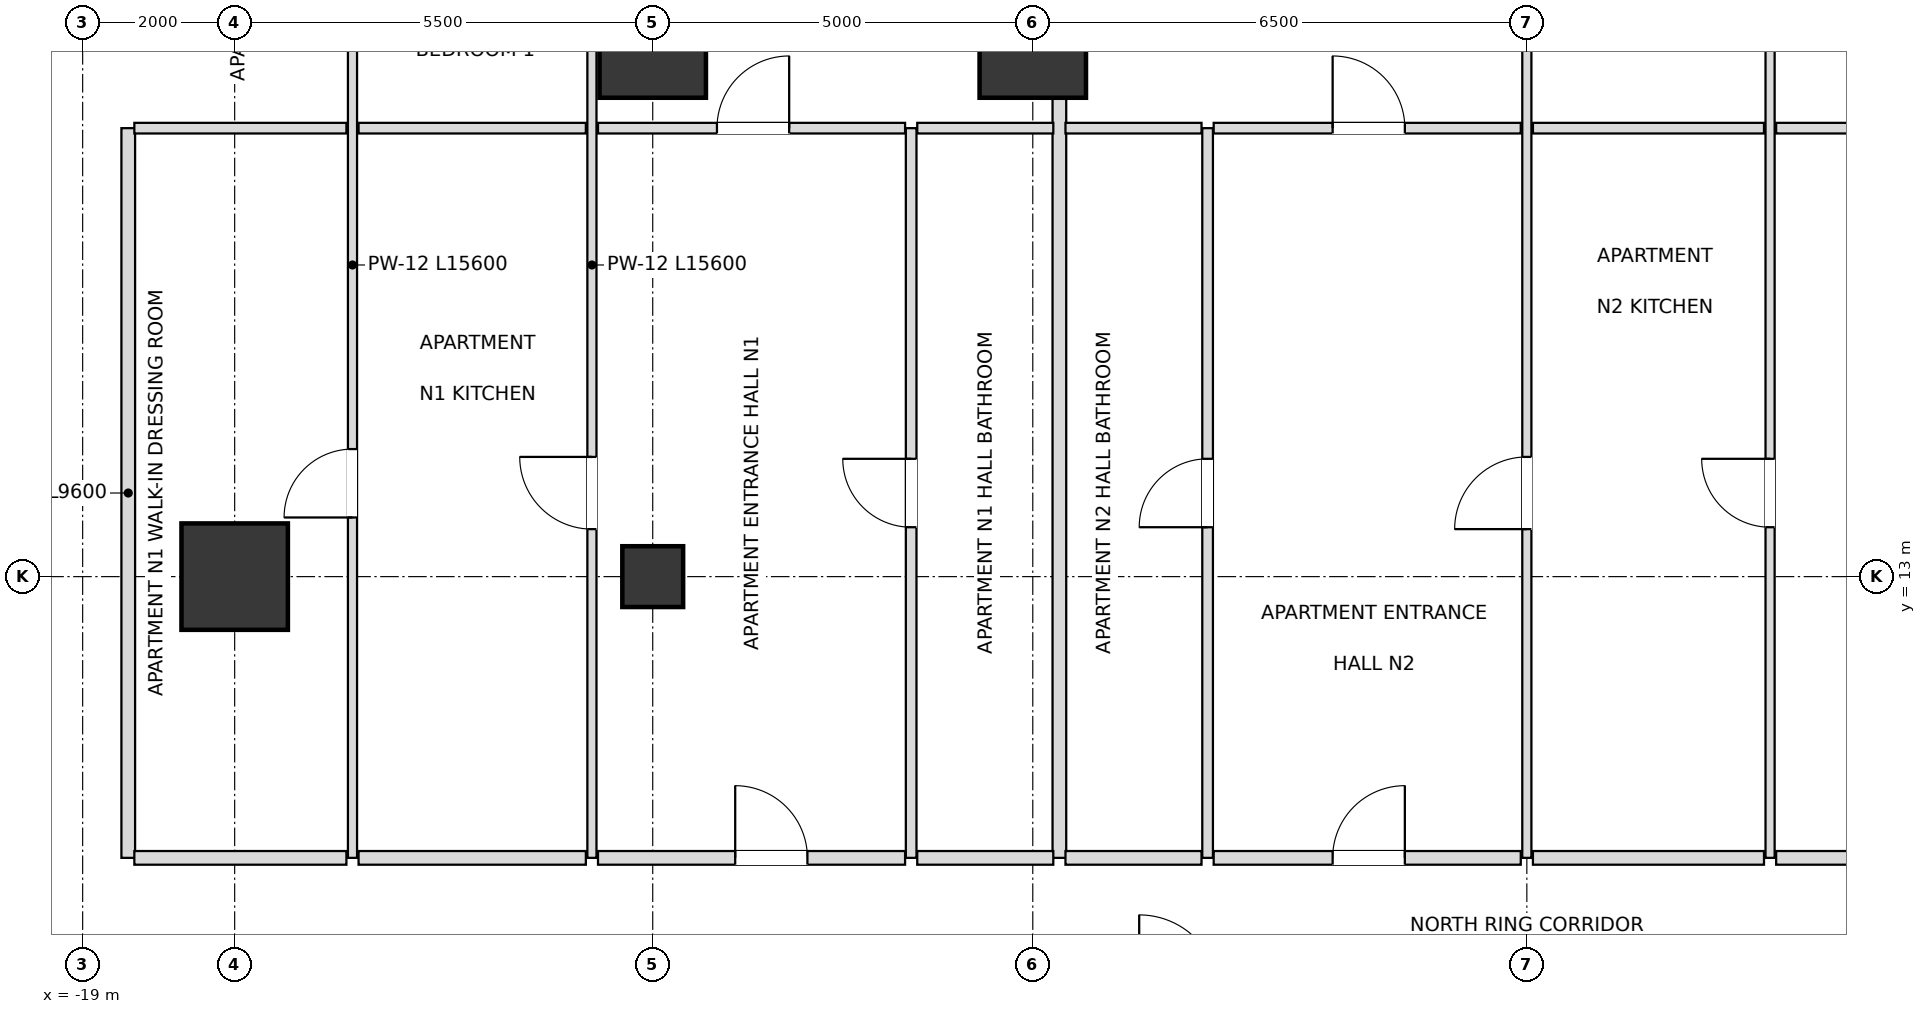
"""IFC4 building model, lengths in metres.
Left out: names, types, materials, properties, quantities, classifications, styles, units other than length and angle.
Written with IfcOpenShell. Run it as: python <this file> out.ifc"""

import sys

from ifc_helpers import new_model, si_unit, direction, frame, frame_2d, origin, origin_2d, place, context, subcontext, project, spatial, rectangle, extrude, element, fill, save


model = new_model("IFC4")
c1 = context("Model", 3, precision=1e-05, world=origin(), true_north=direction((0.0, 1.0)))
c2 = subcontext(c1, "Body", "Model", "MODEL_VIEW")
j1 = project(units=[si_unit("LENGTHUNIT", "METRE"), si_unit("PLANEANGLEUNIT", "RADIAN")], contexts=[c1])
p1 = place(None, origin())
s1 = spatial("IfcSite", under=j1, at=p1, CompositionType="ELEMENT")
p2 = place(p1, origin())
s2 = spatial("IfcBuilding", under=s1, at=p2, CompositionType="ELEMENT")
p3 = place(p2, frame((0.0, 0.0, 46.8)))
s3 = spatial("IfcBuildingStorey", under=s2, at=p3, CompositionType="ELEMENT", Elevation=46.8)
for number, where, z_axis, x_axis in (
    (1, (-6.5, 20.0, 0.0), (0.0, 0.0, 1.0), (1.0, 0.0, 0.0)),
    (2, (-11.5, 20.0, 0.0), (0.0, 0.0, 1.0), (1.0, 0.0, 0.0)),
    (3, (-17.0, 13.0, 0.0), (0.0, 0.0, 1.0), (1.0, 0.0, 0.0)),
):
    element("IfcColumn", number, at=place(p3, frame(where, z_axis=z_axis, x_axis=x_axis)), inside=s3, PredefinedType="USERDEFINED", context=c2, shape_type="SweptSolid", body=[
        extrude(rectangle(XDim=1.4, YDim=1.4, at=origin_2d()), origin(), (0.0, 0.0, 1.0), 3.6),
    ])
p4 = place(p3, frame((-11.5, 13.0, 0.0), z_axis=(0.0, 0.0, 1.0), x_axis=(1.0, 0.0, 0.0)))
e4 = element("IfcColumn", 4, at=p4, inside=s3, PredefinedType="COLUMN", context=c2, shape_type="SweptSolid", body=[
    extrude(rectangle(XDim=0.8, YDim=0.8, at=origin_2d()), origin(), (0.0, 0.0, 1.0), 3.6),
])
p5 = place(p3, frame((-18.4, 9.3, 0.0), z_axis=(0.0, 0.0, 1.0), x_axis=(0.0, 1.0, 0.0)))
e5 = element("IfcWall", 5, at=p5, inside=s3, PredefinedType="PARTITIONING", context=c2, shape_type="SweptSolid", body=[
    extrude(rectangle(XDim=9.6, YDim=0.18, at=frame_2d((4.8, 0.0))), origin(), (0.0, 0.0, 1.0), 2.736),
])
p6 = place(p3, frame((-15.45, 9.3, 0.0), z_axis=(0.0, 0.0, 1.0), x_axis=(0.0, 1.0, 0.0)))
e6 = element("IfcWall", 6, at=p6, inside=s3, PredefinedType="PARTITIONING", context=c2, shape_type="SweptSolid", body=[
    extrude(rectangle(XDim=15.6, YDim=0.12, at=frame_2d((7.8, 0.0))), origin(), (0.0, 0.0, 1.0), 2.736),
])
p7 = place(p6, frame((4.478, 0.0, 0.0)))
e7 = element("IfcOpeningElement", 7, at=p7, cuts=e6, PredefinedType="OPENING", context=c2, shape_type="SweptSolid", body=[
    extrude(rectangle(XDim=0.9, YDim=2.1, at=frame_2d((0.45, 1.05))), frame((0.0, 0.07, 0.0), z_axis=(0.0, -1.0, 0.0), x_axis=(1.0, 0.0, 0.0)), (0.0, 0.0, 1.0), 0.14),
])
p8 = place(p6, frame((12.15, 0.0, 0.0)))
e8 = element("IfcOpeningElement", 8, at=p8, cuts=e6, PredefinedType="OPENING", context=c2, shape_type="SweptSolid", body=[
    extrude(rectangle(XDim=0.9, YDim=2.1, at=frame_2d((0.45, 1.05))), frame((0.0, 0.07, 0.0), z_axis=(0.0, -1.0, 0.0), x_axis=(1.0, 0.0, 0.0)), (0.0, 0.0, 1.0), 0.14),
])
p9 = place(p3, frame((-12.3, 9.3, 0.0), z_axis=(0.0, 0.0, 1.0), x_axis=(0.0, 1.0, 0.0)))
e9 = element("IfcWall", 9, at=p9, inside=s3, PredefinedType="PARTITIONING", context=c2, shape_type="SweptSolid", body=[
    extrude(rectangle(XDim=15.6, YDim=0.12, at=frame_2d((7.8, 0.0))), origin(), (0.0, 0.0, 1.0), 2.736),
])
p10 = place(p9, frame((4.325, 0.0, 0.0)))
e10 = element("IfcOpeningElement", 10, at=p10, cuts=e9, PredefinedType="OPENING", context=c2, shape_type="SweptSolid", body=[
    extrude(rectangle(XDim=0.95, YDim=2.1, at=frame_2d((0.475, 1.05))), frame((0.0, 0.07, 0.0), z_axis=(0.0, -1.0, 0.0), x_axis=(1.0, 0.0, 0.0)), (0.0, 0.0, 1.0), 0.14),
])
p11 = place(p9, frame((12.15, 0.0, 0.0)))
e11 = element("IfcOpeningElement", 11, at=p11, cuts=e9, PredefinedType="OPENING", context=c2, shape_type="SweptSolid", body=[
    extrude(rectangle(XDim=0.9, YDim=2.1, at=frame_2d((0.45, 1.05))), frame((0.0, 0.07, 0.0), z_axis=(0.0, -1.0, 0.0), x_axis=(1.0, 0.0, 0.0)), (0.0, 0.0, 1.0), 0.14),
])
p12 = place(p3, frame((-8.1, 9.3, 0.0), z_axis=(0.0, 0.0, 1.0), x_axis=(0.0, 1.0, 0.0)))
e12 = element("IfcWall", 12, at=p12, inside=s3, PredefinedType="PARTITIONING", context=c2, shape_type="SweptSolid", body=[
    extrude(rectangle(XDim=9.6, YDim=0.14, at=frame_2d((4.8, 0.0))), origin(), (0.0, 0.0, 1.0), 2.816),
])
p13 = place(p12, frame((4.35, 0.0, 0.0)))
e13 = element("IfcOpeningElement", 13, at=p13, cuts=e12, PredefinedType="OPENING", context=c2, shape_type="SweptSolid", body=[
    extrude(rectangle(XDim=0.9, YDim=2.1, at=frame_2d((0.45, 1.05))), frame((0.0, 0.08, 0.0), z_axis=(0.0, -1.0, 0.0), x_axis=(1.0, 0.0, 0.0)), (0.0, 0.0, 1.0), 0.16),
])
p14 = place(p3, frame((-6.15, 9.3, 0.0), z_axis=(0.0, 0.0, 1.0), x_axis=(0.0, 1.0, 0.0)))
e14 = element("IfcWall", 14, at=p14, inside=s3, PredefinedType="PARTITIONING", context=c2, shape_type="SweptSolid", body=[
    extrude(rectangle(XDim=15.6, YDim=0.18, at=frame_2d((7.8, 0.0))), origin(), (0.0, 0.0, 1.0), 2.816),
])
p15 = place(p3, frame((-4.2, 9.3, 0.0), z_axis=(0.0, 0.0, 1.0), x_axis=(0.0, 1.0, 0.0)))
e15 = element("IfcWall", 15, at=p15, inside=s3, PredefinedType="PARTITIONING", context=c2, shape_type="SweptSolid", body=[
    extrude(rectangle(XDim=9.6, YDim=0.14, at=frame_2d((4.8, 0.0))), origin(), (0.0, 0.0, 1.0), 2.948),
])
p16 = place(p15, frame((4.35, 0.0, 0.0)))
e16 = element("IfcOpeningElement", 16, at=p16, cuts=e15, PredefinedType="OPENING", context=c2, shape_type="SweptSolid", body=[
    extrude(rectangle(XDim=0.9, YDim=2.1, at=frame_2d((0.45, 1.05))), frame((0.0, 0.08, 0.0), z_axis=(0.0, -1.0, 0.0), x_axis=(1.0, 0.0, 0.0)), (0.0, 0.0, 1.0), 0.16),
])
p17 = place(p3, frame((0.0, 9.3, 0.0), z_axis=(0.0, 0.0, 1.0), x_axis=(0.0, 1.0, 0.0)))
e17 = element("IfcWall", 17, at=p17, inside=s3, PredefinedType="PARTITIONING", context=c2, shape_type="SweptSolid", body=[
    extrude(rectangle(XDim=15.6, YDim=0.12, at=frame_2d((7.8, 0.0))), origin(), (0.0, 0.0, 1.0), 2.816),
])
p18 = place(p17, frame((4.325, 0.0, 0.0)))
e18 = element("IfcOpeningElement", 18, at=p18, cuts=e17, PredefinedType="OPENING", context=c2, shape_type="SweptSolid", body=[
    extrude(rectangle(XDim=0.95, YDim=2.1, at=frame_2d((0.475, 1.05))), frame((0.0, 0.07, 0.0), z_axis=(0.0, -1.0, 0.0), x_axis=(1.0, 0.0, 0.0)), (0.0, 0.0, 1.0), 0.14),
])
p19 = place(p17, frame((12.15, 0.0, 0.0)))
e19 = element("IfcOpeningElement", 19, at=p19, cuts=e17, PredefinedType="OPENING", context=c2, shape_type="SweptSolid", body=[
    extrude(rectangle(XDim=0.9, YDim=2.1, at=frame_2d((0.45, 1.05))), frame((0.0, 0.07, 0.0), z_axis=(0.0, -1.0, 0.0), x_axis=(1.0, 0.0, 0.0)), (0.0, 0.0, 1.0), 0.14),
])
p20 = place(p3, frame((3.2, 9.3, 0.0), z_axis=(0.0, 0.0, 1.0), x_axis=(0.0, 1.0, 0.0)))
e20 = element("IfcWall", 20, at=p20, inside=s3, PredefinedType="PARTITIONING", context=c2, shape_type="SweptSolid", body=[
    extrude(rectangle(XDim=15.6, YDim=0.12, at=frame_2d((7.8, 0.0))), origin(), (0.0, 0.0, 1.0), 2.816),
])
p21 = place(p20, frame((4.35, 0.0, 0.0)))
e21 = element("IfcOpeningElement", 21, at=p21, cuts=e20, PredefinedType="OPENING", context=c2, shape_type="SweptSolid", body=[
    extrude(rectangle(XDim=0.9, YDim=2.1, at=frame_2d((0.45, 1.05))), frame((0.0, 0.07, 0.0), z_axis=(0.0, -1.0, 0.0), x_axis=(1.0, 0.0, 0.0)), (0.0, 0.0, 1.0), 0.14),
])
p22 = place(p20, frame((12.15, 0.0, 0.0)))
e22 = element("IfcOpeningElement", 22, at=p22, cuts=e20, PredefinedType="OPENING", context=c2, shape_type="SweptSolid", body=[
    extrude(rectangle(XDim=0.9, YDim=2.1, at=frame_2d((0.45, 1.05))), frame((0.0, 0.07, 0.0), z_axis=(0.0, -1.0, 0.0), x_axis=(1.0, 0.0, 0.0)), (0.0, 0.0, 1.0), 0.14),
])
p23 = place(p3, frame((-18.32, 9.3, 0.0), z_axis=(0.0, 0.0, 1.0), x_axis=(1.0, 0.0, 0.0)))
e23 = element("IfcWall", 23, at=p23, inside=s3, PredefinedType="PARTITIONING", context=c2, shape_type="SweptSolid", body=[
    extrude(rectangle(XDim=2.79, YDim=0.18, at=frame_2d((1.395, 0.0))), origin(), (0.0, 0.0, 1.0), 2.816),
])
p24 = place(p3, frame((-15.37, 9.3, 0.0), z_axis=(0.0, 0.0, 1.0), x_axis=(1.0, 0.0, 0.0)))
e24 = element("IfcWall", 24, at=p24, inside=s3, PredefinedType="PARTITIONING", context=c2, shape_type="SweptSolid", body=[
    extrude(rectangle(XDim=2.99, YDim=0.18, at=frame_2d((1.495, 0.0))), origin(), (0.0, 0.0, 1.0), 3.38),
])
p25 = place(p3, frame((-12.22, 9.3, 0.0), z_axis=(0.0, 0.0, 1.0), x_axis=(1.0, 0.0, 0.0)))
e25 = element("IfcWall", 25, at=p25, inside=s3, PredefinedType="PARTITIONING", context=c2, shape_type="SweptSolid", body=[
    extrude(rectangle(XDim=4.04, YDim=0.18, at=frame_2d((2.02, 0.0))), origin(), (0.0, 0.0, 1.0), 3.38),
])
p26 = place(p25, frame((1.805, 0.0, 0.0)))
e26 = element("IfcOpeningElement", 26, at=p26, cuts=e25, PredefinedType="OPENING", context=c2, shape_type="SweptSolid", body=[
    extrude(rectangle(XDim=0.95, YDim=2.15, at=frame_2d((0.475, 1.075))), frame((0.0, 0.1, 0.0), z_axis=(0.0, -1.0, 0.0), x_axis=(1.0, 0.0, 0.0)), (0.0, 0.0, 1.0), 0.2),
])
p27 = place(p3, frame((-8.02, 9.3, 0.0), z_axis=(0.0, 0.0, 1.0), x_axis=(1.0, 0.0, 0.0)))
e27 = element("IfcWall", 27, at=p27, inside=s3, PredefinedType="PARTITIONING", context=c2, shape_type="SweptSolid", body=[
    extrude(rectangle(XDim=1.79, YDim=0.18, at=frame_2d((0.895, 0.0))), origin(), (0.0, 0.0, 1.0), 2.816),
])
p28 = place(p3, frame((-6.07, 9.3, 0.0), z_axis=(0.0, 0.0, 1.0), x_axis=(1.0, 0.0, 0.0)))
e28 = element("IfcWall", 28, at=p28, inside=s3, PredefinedType="PARTITIONING", context=c2, shape_type="SweptSolid", body=[
    extrude(rectangle(XDim=1.79, YDim=0.18, at=frame_2d((0.895, 0.0))), origin(), (0.0, 0.0, 1.0), 3.38),
])
p29 = place(p3, frame((-4.12, 9.3, 0.0), z_axis=(0.0, 0.0, 1.0), x_axis=(1.0, 0.0, 0.0)))
e29 = element("IfcWall", 29, at=p29, inside=s3, PredefinedType="PARTITIONING", context=c2, shape_type="SweptSolid", body=[
    extrude(rectangle(XDim=4.04, YDim=0.18, at=frame_2d((2.02, 0.0))), origin(), (0.0, 0.0, 1.0), 3.38),
])
p30 = place(p29, frame((1.565, 0.0, 0.0)))
e30 = element("IfcOpeningElement", 30, at=p30, cuts=e29, PredefinedType="OPENING", context=c2, shape_type="SweptSolid", body=[
    extrude(rectangle(XDim=0.95, YDim=2.15, at=frame_2d((0.475, 1.075))), frame((0.0, 0.1, 0.0), z_axis=(0.0, -1.0, 0.0), x_axis=(1.0, 0.0, 0.0)), (0.0, 0.0, 1.0), 0.2),
])
p31 = place(p3, frame((0.08, 9.3, 0.0), z_axis=(0.0, 0.0, 1.0), x_axis=(1.0, 0.0, 0.0)))
e31 = element("IfcWall", 31, at=p31, inside=s3, PredefinedType="PARTITIONING", context=c2, shape_type="SweptSolid", body=[
    extrude(rectangle(XDim=3.04, YDim=0.18, at=frame_2d((1.52, 0.0))), origin(), (0.0, 0.0, 1.0), 3.38),
])
p32 = place(p3, frame((3.28, 9.3, 0.0), z_axis=(0.0, 0.0, 1.0), x_axis=(1.0, 0.0, 0.0)))
e32 = element("IfcWall", 32, at=p32, inside=s3, PredefinedType="PARTITIONING", context=c2, shape_type="SweptSolid", body=[
    extrude(rectangle(XDim=2.79, YDim=0.18, at=frame_2d((1.395, 0.0))), origin(), (0.0, 0.0, 1.0), 3.38),
])
p33 = place(p3, frame((-18.32, 18.9, 0.0), z_axis=(0.0, 0.0, 1.0), x_axis=(1.0, 0.0, 0.0)))
e33 = element("IfcWall", 33, at=p33, inside=s3, PredefinedType="PARTITIONING", context=c2, shape_type="SweptSolid", body=[
    extrude(rectangle(XDim=2.79, YDim=0.14, at=frame_2d((1.395, 0.0))), origin(), (0.0, 0.0, 1.0), 2.736),
])
p34 = place(p3, frame((-15.37, 18.9, 0.0), z_axis=(0.0, 0.0, 1.0), x_axis=(1.0, 0.0, 0.0)))
e34 = element("IfcWall", 34, at=p34, inside=s3, PredefinedType="PARTITIONING", context=c2, shape_type="SweptSolid", body=[
    extrude(rectangle(XDim=2.99, YDim=0.14, at=frame_2d((1.495, 0.0))), origin(), (0.0, 0.0, 1.0), 2.736),
])
p35 = place(p3, frame((-12.22, 18.9, 0.0), z_axis=(0.0, 0.0, 1.0), x_axis=(1.0, 0.0, 0.0)))
e35 = element("IfcWall", 35, at=p35, inside=s3, PredefinedType="PARTITIONING", context=c2, shape_type="SweptSolid", body=[
    extrude(rectangle(XDim=4.04, YDim=0.14, at=frame_2d((2.02, 0.0))), origin(), (0.0, 0.0, 1.0), 2.736),
])
p36 = place(p35, frame((1.565, 0.0, 0.0)))
e36 = element("IfcOpeningElement", 36, at=p36, cuts=e35, PredefinedType="OPENING", context=c2, shape_type="SweptSolid", body=[
    extrude(rectangle(XDim=0.95, YDim=2.1, at=frame_2d((0.475, 1.05))), frame((0.0, 0.08, 0.0), z_axis=(0.0, -1.0, 0.0), x_axis=(1.0, 0.0, 0.0)), (0.0, 0.0, 1.0), 0.16),
])
p37 = place(p3, frame((-8.02, 18.9, 0.0), z_axis=(0.0, 0.0, 1.0), x_axis=(1.0, 0.0, 0.0)))
e37 = element("IfcWall", 37, at=p37, inside=s3, PredefinedType="PARTITIONING", context=c2, shape_type="SweptSolid", body=[
    extrude(rectangle(XDim=1.79, YDim=0.14, at=frame_2d((0.895, 0.0))), origin(), (0.0, 0.0, 1.0), 2.816),
])
p38 = place(p3, frame((-6.07, 18.9, 0.0), z_axis=(0.0, 0.0, 1.0), x_axis=(1.0, 0.0, 0.0)))
e38 = element("IfcWall", 38, at=p38, inside=s3, PredefinedType="PARTITIONING", context=c2, shape_type="SweptSolid", body=[
    extrude(rectangle(XDim=1.79, YDim=0.14, at=frame_2d((0.895, 0.0))), origin(), (0.0, 0.0, 1.0), 3.38),
])
p39 = place(p3, frame((-4.12, 18.9, 0.0), z_axis=(0.0, 0.0, 1.0), x_axis=(1.0, 0.0, 0.0)))
e39 = element("IfcWall", 39, at=p39, inside=s3, PredefinedType="PARTITIONING", context=c2, shape_type="SweptSolid", body=[
    extrude(rectangle(XDim=4.04, YDim=0.14, at=frame_2d((2.02, 0.0))), origin(), (0.0, 0.0, 1.0), 3.38),
])
p40 = place(p39, frame((1.565, 0.0, 0.0)))
e40 = element("IfcOpeningElement", 40, at=p40, cuts=e39, PredefinedType="OPENING", context=c2, shape_type="SweptSolid", body=[
    extrude(rectangle(XDim=0.95, YDim=2.1, at=frame_2d((0.475, 1.05))), frame((0.0, 0.08, 0.0), z_axis=(0.0, -1.0, 0.0), x_axis=(1.0, 0.0, 0.0)), (0.0, 0.0, 1.0), 0.16),
])
p41 = place(p3, frame((0.08, 18.9, 0.0), z_axis=(0.0, 0.0, 1.0), x_axis=(1.0, 0.0, 0.0)))
e41 = element("IfcWall", 41, at=p41, inside=s3, PredefinedType="PARTITIONING", context=c2, shape_type="SweptSolid", body=[
    extrude(rectangle(XDim=3.04, YDim=0.14, at=frame_2d((1.52, 0.0))), origin(), (0.0, 0.0, 1.0), 3.38),
])
p42 = place(p3, frame((3.28, 18.9, 0.0), z_axis=(0.0, 0.0, 1.0), x_axis=(1.0, 0.0, 0.0)))
e42 = element("IfcWall", 42, at=p42, inside=s3, PredefinedType="PARTITIONING", context=c2, shape_type="SweptSolid", body=[
    extrude(rectangle(XDim=2.79, YDim=0.14, at=frame_2d((1.395, 0.0))), origin(), (0.0, 0.0, 1.0), 3.38),
])
p43 = place(p13, origin())
e43 = element("IfcDoor", 43, at=p43, inside=s3, OperationType="SINGLE_SWING_RIGHT", PredefinedType="DOOR", context=c2, shape_type="SweptSolid", body=[
    extrude(rectangle(XDim=0.9, YDim=2.1, at=frame_2d((0.45, 1.05))), frame((0.0, 0.025, 0.0), z_axis=(0.0, -1.0, 0.0), x_axis=(1.0, 0.0, 0.0)), (0.0, 0.0, 1.0), 0.05),
])
fill(e13, e43)
p44 = place(p26, origin())
e44 = element("IfcDoor", 44, at=p44, inside=s3, OperationType="SINGLE_SWING_LEFT", PredefinedType="DOOR", context=c2, shape_type="SweptSolid", body=[
    extrude(rectangle(XDim=0.95, YDim=2.15, at=frame_2d((0.475, 1.075))), frame((0.0, 0.025, 0.0), z_axis=(0.0, -1.0, 0.0), x_axis=(1.0, 0.0, 0.0)), (0.0, 0.0, 1.0), 0.05),
])
fill(e26, e44)
p45 = place(p10, origin())
e45 = element("IfcDoor", 45, at=p45, inside=s3, OperationType="SINGLE_SWING_RIGHT", PredefinedType="DOOR", context=c2, shape_type="SweptSolid", body=[
    extrude(rectangle(XDim=0.95, YDim=2.1, at=frame_2d((0.475, 1.05))), frame((0.0, 0.025, 0.0), z_axis=(0.0, -1.0, 0.0), x_axis=(1.0, 0.0, 0.0)), (0.0, 0.0, 1.0), 0.05),
])
fill(e10, e45)
p46 = place(p7, origin())
e46 = element("IfcDoor", 46, at=p46, inside=s3, OperationType="SINGLE_SWING_LEFT", PredefinedType="DOOR", context=c2, shape_type="SweptSolid", body=[
    extrude(rectangle(XDim=0.9, YDim=2.1, at=frame_2d((0.45, 1.05))), frame((0.0, 0.025, 0.0), z_axis=(0.0, -1.0, 0.0), x_axis=(1.0, 0.0, 0.0)), (0.0, 0.0, 1.0), 0.05),
])
fill(e7, e46)
p47 = place(p36, origin())
e47 = element("IfcDoor", 47, at=p47, inside=s3, OperationType="SINGLE_SWING_RIGHT", PredefinedType="DOOR", context=c2, shape_type="SweptSolid", body=[
    extrude(rectangle(XDim=0.95, YDim=2.1, at=frame_2d((0.475, 1.05))), frame((0.0, 0.025, 0.0), z_axis=(0.0, -1.0, 0.0), x_axis=(1.0, 0.0, 0.0)), (0.0, 0.0, 1.0), 0.05),
])
fill(e36, e47)
p48 = place(p16, origin())
e48 = element("IfcDoor", 48, at=p48, inside=s3, OperationType="SINGLE_SWING_LEFT", PredefinedType="DOOR", context=c2, shape_type="SweptSolid", body=[
    extrude(rectangle(XDim=0.9, YDim=2.1, at=frame_2d((0.45, 1.05))), frame((0.0, 0.025, 0.0), z_axis=(0.0, -1.0, 0.0), x_axis=(1.0, 0.0, 0.0)), (0.0, 0.0, 1.0), 0.05),
])
fill(e16, e48)
p49 = place(p30, origin())
e49 = element("IfcDoor", 49, at=p49, inside=s3, OperationType="SINGLE_SWING_RIGHT", PredefinedType="DOOR", context=c2, shape_type="SweptSolid", body=[
    extrude(rectangle(XDim=0.95, YDim=2.15, at=frame_2d((0.475, 1.075))), frame((0.0, 0.025, 0.0), z_axis=(0.0, -1.0, 0.0), x_axis=(1.0, 0.0, 0.0)), (0.0, 0.0, 1.0), 0.05),
])
fill(e30, e49)
p50 = place(p18, origin())
e50 = element("IfcDoor", 50, at=p50, inside=s3, OperationType="SINGLE_SWING_LEFT", PredefinedType="DOOR", context=c2, shape_type="SweptSolid", body=[
    extrude(rectangle(XDim=0.95, YDim=2.1, at=frame_2d((0.475, 1.05))), frame((0.0, 0.025, 0.0), z_axis=(0.0, -1.0, 0.0), x_axis=(1.0, 0.0, 0.0)), (0.0, 0.0, 1.0), 0.05),
])
fill(e18, e50)
p51 = place(p21, origin())
e51 = element("IfcDoor", 51, at=p51, inside=s3, OperationType="SINGLE_SWING_RIGHT", PredefinedType="DOOR", context=c2, shape_type="SweptSolid", body=[
    extrude(rectangle(XDim=0.9, YDim=2.1, at=frame_2d((0.45, 1.05))), frame((0.0, 0.025, 0.0), z_axis=(0.0, -1.0, 0.0), x_axis=(1.0, 0.0, 0.0)), (0.0, 0.0, 1.0), 0.05),
])
fill(e21, e51)
p52 = place(p40, origin())
e52 = element("IfcDoor", 52, at=p52, inside=s3, OperationType="SINGLE_SWING_LEFT", PredefinedType="DOOR", context=c2, shape_type="SweptSolid", body=[
    extrude(rectangle(XDim=0.95, YDim=2.1, at=frame_2d((0.475, 1.05))), frame((0.0, 0.025, 0.0), z_axis=(0.0, -1.0, 0.0), x_axis=(1.0, 0.0, 0.0)), (0.0, 0.0, 1.0), 0.05),
])
fill(e40, e52)
save(model, sys.argv[1])
